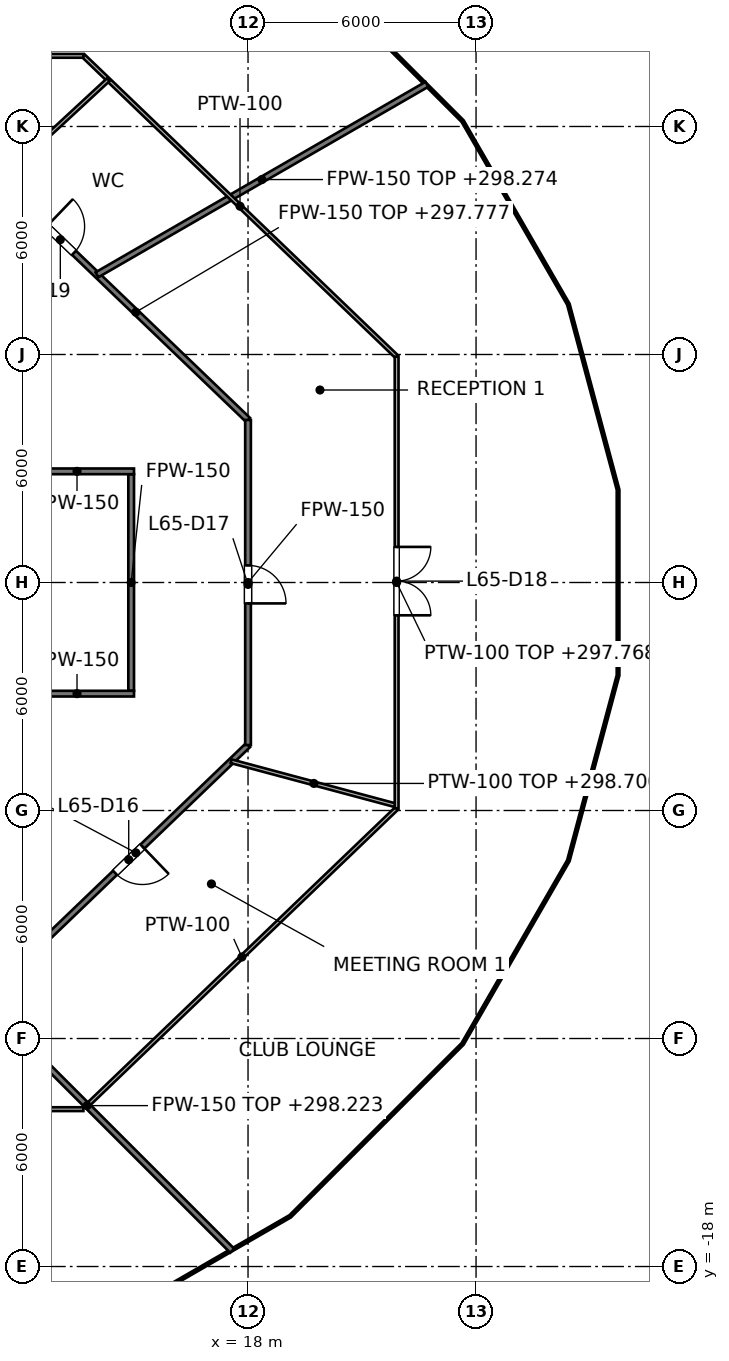
"""IFC4 building model, lengths in metres.
Left out: names, types, materials, properties, quantities, classifications, styles, units other than length and angle.
Written with IfcOpenShell. Run it as: python <this file> out.ifc"""

import sys

from ifc_helpers import new_model, si_unit, direction, frame, frame_2d, origin, place, context, subcontext, project, spatial, rectangle, extrude, element, fill, save


model = new_model("IFC4")
c1 = context("Model", 3, precision=1e-05, world=origin(), true_north=direction((0.0, 1.0)))
c2 = subcontext(c1, "Body", "Model", "MODEL_VIEW")
j1 = project(units=[si_unit("LENGTHUNIT", "METRE"), si_unit("PLANEANGLEUNIT", "RADIAN")], contexts=[c1])
p1 = place(None, origin())
s1 = spatial("IfcSite", under=j1, at=p1, CompositionType="ELEMENT")
p2 = place(p1, origin())
s2 = spatial("IfcBuilding", under=s1, at=p2, CompositionType="ELEMENT")
p3 = place(p2, frame((0.0, 0.0, 295.0)))
s3 = spatial("IfcBuildingStorey", under=s2, at=p3, CompositionType="ELEMENT", Elevation=295.0)
p4 = place(p3, frame((14.925, -2.85, 0.0), z_axis=(0.0, 0.0, 1.0), x_axis=(0.0, 1.0, 0.0)))
e1 = element("IfcWall", 1, at=p4, inside=s3, PredefinedType="PARTITIONING", context=c2, shape_type="SweptSolid", body=[
    extrude(rectangle(XDim=5.7, YDim=0.15, at=frame_2d((2.85, 0.0))), origin(), (0.0, 0.0, 1.0), 2.768),
])
for number, where, z_axis, x_axis in (
    (2, (12.0, 2.925, 0.0), (0.0, 0.0, 1.0), (1.0, 0.0, 0.0)),
    (3, (12.0, -2.925, 0.0), (0.0, 0.0, 1.0), (1.0, 0.0, 0.0)),
):
    element("IfcWall", number, at=place(p3, frame(where, z_axis=z_axis, x_axis=x_axis)), inside=s3, PredefinedType="PARTITIONING", context=c2, shape_type="SweptSolid", body=[
        extrude(rectangle(XDim=3.0, YDim=0.15, at=frame_2d((1.5, 0.0))), origin(), (0.0, 0.0, 1.0), 2.768),
    ])
p5 = place(p3, frame((9.949, -9.949, 0.0), z_axis=(0.0, 0.0, 1.0), x_axis=(0.707106781187, -0.707106781187, 0.0)))
e4 = element("IfcWall", 4, at=p5, inside=s3, PredefinedType="PARTITIONING", context=c2, shape_type="SweptSolid", body=[
    extrude(rectangle(XDim=10.796, YDim=0.15, at=frame_2d((5.398, 0.0))), origin(), (0.0, 0.0, 1.0), 3.223),
])
p6 = place(p3, frame((12.095, 9.949, 0.0), z_axis=(0.0, 0.0, 1.0), x_axis=(0.721290181137, -0.692633001376, 0.0)))
e5 = element("IfcWall", 5, at=p6, inside=s3, PredefinedType="PARTITIONING", context=c2, shape_type="SweptSolid", body=[
    extrude(rectangle(XDim=8.187, YDim=0.15, at=frame_2d((4.094, 0.0))), origin(), (0.0, 0.0, 1.0), 2.777),
])
p7 = place(p6, frame((0.839, 0.0, 0.0)))
e6 = element("IfcOpeningElement", 6, at=p7, cuts=e5, PredefinedType="OPENING", context=c2, shape_type="SweptSolid", body=[
    extrude(rectangle(XDim=1.0, YDim=2.1, at=frame_2d((0.5, 1.05))), frame((0.0, 0.075, 0.0), z_axis=(0.0, -1.0, 0.0), x_axis=(1.0, 0.0, 0.0)), (0.0, 0.0, 1.0), 0.15),
])
p8 = place(p3, frame((14.024, 8.097, 0.0), z_axis=(0.0, 0.0, 1.0), x_axis=(0.866012014455, 0.500023190282, 0.0)))
e7 = element("IfcWall", 7, at=p8, inside=s3, PredefinedType="PARTITIONING", context=c2, shape_type="SweptSolid", body=[
    extrude(rectangle(XDim=10.025, YDim=0.15, at=frame_2d((5.013, 0.0))), origin(), (0.0, 0.0, 1.0), 3.274),
])
p9 = place(p3, frame((12.095, -9.949, 0.0), z_axis=(0.0, 0.0, 1.0), x_axis=(0.721348586031, 0.692572174889, 0.0)))
e8 = element("IfcWall", 8, at=p9, inside=s3, PredefinedType="PARTITIONING", context=c2, shape_type="SweptSolid", body=[
    extrude(rectangle(XDim=8.187, YDim=0.15, at=frame_2d((4.094, 0.0))), origin(), (0.0, 0.0, 1.0), 2.777),
])
p10 = place(p9, frame((3.334, 0.0, 0.0)))
e9 = element("IfcOpeningElement", 9, at=p10, cuts=e8, PredefinedType="OPENING", context=c2, shape_type="SweptSolid", body=[
    extrude(rectangle(XDim=1.0, YDim=2.1, at=frame_2d((0.5, 1.05))), frame((0.0, 0.075, 0.0), z_axis=(0.0, -1.0, 0.0), x_axis=(1.0, 0.0, 0.0)), (0.0, 0.0, 1.0), 0.15),
])
p11 = place(p3, frame((18.0, -4.278, 0.0), z_axis=(0.0, 0.0, 1.0), x_axis=(0.0, 1.0, 0.0)))
e10 = element("IfcWall", 10, at=p11, inside=s3, PredefinedType="PARTITIONING", context=c2, shape_type="SweptSolid", body=[
    extrude(rectangle(XDim=8.556, YDim=0.15, at=frame_2d((4.278, 0.0))), origin(), (0.0, 0.0, 1.0), 2.768),
])
p12 = place(p11, frame((3.728, 0.0, 0.0)))
e11 = element("IfcOpeningElement", 11, at=p12, cuts=e10, PredefinedType="OPENING", context=c2, shape_type="SweptSolid", body=[
    extrude(rectangle(XDim=1.0, YDim=2.1, at=frame_2d((0.5, 1.05))), frame((0.0, 0.075, 0.0), z_axis=(0.0, -1.0, 0.0), x_axis=(1.0, 0.0, 0.0)), (0.0, 0.0, 1.0), 0.15),
])
p13 = place(p3, frame((13.668, 13.859, 0.0), z_axis=(0.0, 0.0, 1.0), x_axis=(0.721286980933, -0.692636333971, 0.0)))
e12 = element("IfcWall", 12, at=p13, inside=s3, PredefinedType="PARTITIONING", context=c2, shape_type="SweptSolid", body=[
    extrude(rectangle(XDim=11.427, YDim=0.1, at=frame_2d((5.713, 0.0))), origin(), (0.0, 0.0, 1.0), 2.777),
])
p14 = place(p3, frame((17.556, -4.704, 0.0), z_axis=(0.0, 0.0, 1.0), x_axis=(0.965906947234, -0.258889492418, 0.0)))
e13 = element("IfcWall", 13, at=p14, inside=s3, PredefinedType="PARTITIONING", context=c2, shape_type="SweptSolid", body=[
    extrude(rectangle(XDim=4.508, YDim=0.1, at=frame_2d((2.254, 0.0))), origin(), (0.0, 0.0, 1.0), 3.7),
])
p15 = place(p3, frame((-13.668, -13.859, 0.0), z_axis=(0.0, 0.0, 1.0), x_axis=(1.0, 0.0, 0.0)))
e14 = element("IfcWall", 14, at=p15, inside=s3, PredefinedType="PARTITIONING", context=c2, shape_type="SweptSolid", body=[
    extrude(rectangle(XDim=27.336, YDim=0.1, at=frame_2d((13.668, 0.0))), origin(), (0.0, 0.0, 1.0), 2.768),
])
p16 = place(p15, frame((4.027, 0.0, 0.0)))
e15 = element("IfcOpeningElement", 15, at=p16, cuts=e14, PredefinedType="OPENING", context=c2, shape_type="SweptSolid", body=[
    extrude(rectangle(XDim=1.8, YDim=2.1, at=frame_2d((0.9, 1.05))), frame((0.0, 0.05, 0.0), z_axis=(0.0, -1.0, 0.0), x_axis=(1.0, 0.0, 0.0)), (0.0, 0.0, 1.0), 0.1),
])
p17 = place(p15, frame((20.699, 0.0, 0.0)))
e16 = element("IfcOpeningElement", 16, at=p17, cuts=e14, PredefinedType="OPENING", context=c2, shape_type="SweptSolid", body=[
    extrude(rectangle(XDim=1.8, YDim=2.1, at=frame_2d((0.9, 1.05))), frame((0.0, 0.05, 0.0), z_axis=(0.0, -1.0, 0.0), x_axis=(1.0, 0.0, 0.0)), (0.0, 0.0, 1.0), 0.1),
])
p18 = place(p3, frame((-13.668, 13.859, 0.0), z_axis=(0.0, 0.0, 1.0), x_axis=(1.0, 0.0, 0.0)))
e17 = element("IfcWall", 17, at=p18, inside=s3, PredefinedType="PARTITIONING", context=c2, shape_type="SweptSolid", body=[
    extrude(rectangle(XDim=27.336, YDim=0.1, at=frame_2d((13.668, 0.0))), origin(), (0.0, 0.0, 1.0), 2.768),
])
p19 = place(p18, frame((19.633, 0.0, 0.0)))
e18 = element("IfcOpeningElement", 18, at=p19, cuts=e17, PredefinedType="OPENING", context=c2, shape_type="SweptSolid", body=[
    extrude(rectangle(XDim=1.8, YDim=2.1, at=frame_2d((0.9, 1.05))), frame((0.0, 0.05, 0.0), z_axis=(0.0, -1.0, 0.0), x_axis=(1.0, 0.0, 0.0)), (0.0, 0.0, 1.0), 0.1),
])
p20 = place(p3, frame((10.777, 9.949, 0.0), z_axis=(0.0, 0.0, 1.0), x_axis=(0.733892218001, 0.679265936403, 0.0)))
e19 = element("IfcWall", 19, at=p20, inside=s3, PredefinedType="PARTITIONING", context=c2, shape_type="SweptSolid", body=[
    extrude(rectangle(XDim=4.831, YDim=0.1, at=frame_2d((2.416, 0.0))), origin(), (0.0, 0.0, 1.0), 2.777),
])
p21 = place(p3, frame((13.765, -13.765, 0.0), z_axis=(0.0, 0.0, 1.0), x_axis=(0.721423180805, 0.692494472323, 0.0)))
e20 = element("IfcWall", 20, at=p21, inside=s3, PredefinedType="PARTITIONING", context=c2, shape_type="SweptSolid", body=[
    extrude(rectangle(XDim=11.292, YDim=0.1, at=frame_2d((5.646, 0.0))), origin(), (0.0, 0.0, 1.0), 2.777),
])
p22 = place(p3, frame((21.91, -5.944, 0.0), z_axis=(0.0, 0.0, 1.0), x_axis=(0.0, 1.0, 0.0)))
e21 = element("IfcWall", 21, at=p22, inside=s3, PredefinedType="PARTITIONING", context=c2, shape_type="SweptSolid", body=[
    extrude(rectangle(XDim=11.888, YDim=0.1, at=frame_2d((5.944, 0.0))), origin(), (0.0, 0.0, 1.0), 2.768),
])
p23 = place(p22, frame((5.081, 0.0, 0.0)))
e22 = element("IfcOpeningElement", 22, at=p23, cuts=e21, PredefinedType="OPENING", context=c2, shape_type="SweptSolid", body=[
    extrude(rectangle(XDim=1.8, YDim=2.1, at=frame_2d((0.9, 1.05))), frame((0.0, 0.05, 0.0), z_axis=(0.0, -1.0, 0.0), x_axis=(1.0, 0.0, 0.0)), (0.0, 0.0, 1.0), 0.1),
])
p24 = place(p10, origin())
e23 = element("IfcDoor", 23, at=p24, inside=s3, OperationType="SINGLE_SWING_RIGHT", PredefinedType="DOOR", context=c2, shape_type="SweptSolid", body=[
    extrude(rectangle(XDim=1.0, YDim=2.1, at=frame_2d((0.5, 1.05))), frame((0.0, 0.025, 0.0), z_axis=(0.0, -1.0, 0.0), x_axis=(1.0, 0.0, 0.0)), (0.0, 0.0, 1.0), 0.05),
])
fill(e9, e23)
p25 = place(p12, origin())
e24 = element("IfcDoor", 24, at=p25, inside=s3, OperationType="SINGLE_SWING_LEFT", PredefinedType="DOOR", context=c2, shape_type="SweptSolid", body=[
    extrude(rectangle(XDim=1.0, YDim=2.1, at=frame_2d((0.5, 1.05))), frame((0.0, 0.025, 0.0), z_axis=(0.0, -1.0, 0.0), x_axis=(1.0, 0.0, 0.0)), (0.0, 0.0, 1.0), 0.05),
])
fill(e11, e24)
p26 = place(p23, origin())
e25 = element("IfcDoor", 25, at=p26, inside=s3, OperationType="DOUBLE_DOOR_SINGLE_SWING", PredefinedType="DOOR", context=c2, shape_type="SweptSolid", body=[
    extrude(rectangle(XDim=1.8, YDim=2.1, at=frame_2d((0.9, 1.05))), frame((0.0, 0.025, 0.0), z_axis=(0.0, -1.0, 0.0), x_axis=(1.0, 0.0, 0.0)), (0.0, 0.0, 1.0), 0.05),
])
fill(e22, e25)
p27 = place(p7, origin())
e26 = element("IfcDoor", 26, at=p27, inside=s3, OperationType="SINGLE_SWING_LEFT", PredefinedType="DOOR", context=c2, shape_type="SweptSolid", body=[
    extrude(rectangle(XDim=1.0, YDim=2.1, at=frame_2d((0.5, 1.05))), frame((0.0, 0.025, 0.0), z_axis=(0.0, -1.0, 0.0), x_axis=(1.0, 0.0, 0.0)), (0.0, 0.0, 1.0), 0.05),
])
fill(e6, e26)
save(model, sys.argv[1])
